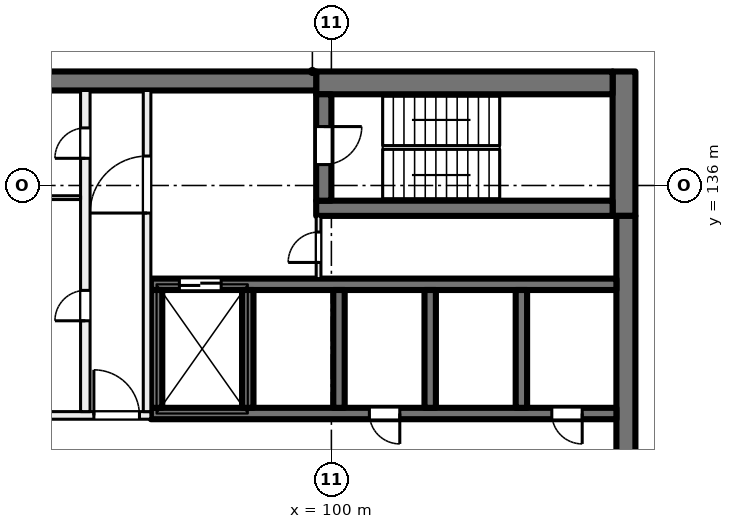
"""IFC4 building model, lengths in metres.
Left out: names, types, materials, properties, quantities, classifications, styles, units other than length and angle.
Written with IfcOpenShell. Run it as: python <this file> out.ifc"""

import sys

from ifc_helpers import new_model, si_unit, direction, frame, frame_2d, origin, place, context, subcontext, project, spatial, rectangle, extrude, element, fill, save


model = new_model("IFC4")
c1 = context("Model", 3, precision=1e-05, world=origin(), true_north=direction((0.0, 1.0)))
c2 = subcontext(c1, "Body", "Model", "MODEL_VIEW")
j1 = project(units=[si_unit("LENGTHUNIT", "METRE"), si_unit("PLANEANGLEUNIT", "RADIAN")], contexts=[c1])
p1 = place(None, origin())
s1 = spatial("IfcSite", under=j1, at=p1, CompositionType="ELEMENT")
p2 = place(p1, origin())
s2 = spatial("IfcBuilding", under=s1, at=p2, CompositionType="ELEMENT")
p3 = place(p2, frame((0.0, 0.0, 216.0)))
s3 = spatial("IfcBuildingStorey", under=s2, at=p3, CompositionType="ELEMENT", Elevation=216.0)
p4 = place(p3, frame((107.7, 139.0, 0.0), z_axis=(0.0, 0.0, 1.0), x_axis=(0.0, -1.0, 0.0)))
e1 = element("IfcWall", 1, at=p4, inside=s3, PredefinedType="SHEAR", context=c2, shape_type="SweptSolid", body=[
    extrude(rectangle(XDim=3.8, YDim=0.6, at=frame_2d((1.9, 0.0))), origin(), (0.0, 0.0, 1.0), 4.0),
])
p5 = place(p3, frame((107.75, 135.2, 0.0), z_axis=(0.0, 0.0, 1.0), x_axis=(0.0, -1.0, 0.0)))
e2 = element("IfcWall", 2, at=p5, inside=s3, PredefinedType="SHEAR", context=c2, shape_type="SweptSolid", body=[
    extrude(rectangle(XDim=14.4, YDim=0.5, at=frame_2d((7.2, 0.0))), origin(), (0.0, 0.0, 1.0), 4.0),
])
p6 = place(p3, frame((107.4, 138.7, 0.0), z_axis=(0.0, 0.0, 1.0), x_axis=(-1.0, 0.0, 0.0)))
e3 = element("IfcWall", 3, at=p6, inside=s3, PredefinedType="SHEAR", context=c2, shape_type="SweptSolid", body=[
    extrude(rectangle(XDim=7.8, YDim=0.6, at=frame_2d((3.9, 0.0))), origin(), (0.0, 0.0, 1.0), 4.0),
])
p7 = place(p3, frame((99.6, 138.75, 0.0), z_axis=(0.0, 0.0, 1.0), x_axis=(-1.0, 0.0, 0.0)))
e4 = element("IfcWall", 4, at=p7, inside=s3, PredefinedType="SHEAR", context=c2, shape_type="SweptSolid", body=[
    extrude(rectangle(XDim=8.975, YDim=0.5, at=frame_2d((4.488, 0.0))), origin(), (0.0, 0.0, 1.0), 4.0),
])
p8 = place(p3, frame((107.4, 135.4, 0.0), z_axis=(0.0, 0.0, 1.0), x_axis=(-1.0, 0.0, 0.0)))
e5 = element("IfcWall", 5, at=p8, inside=s3, PredefinedType="SHEAR", context=c2, shape_type="SweptSolid", body=[
    extrude(rectangle(XDim=7.8, YDim=0.4, at=frame_2d((3.9, 0.0))), origin(), (0.0, 0.0, 1.0), 4.0),
])
p9 = place(p3, frame((99.8, 138.4, 0.0), z_axis=(0.0, 0.0, 1.0), x_axis=(0.0, -1.0, 0.0)))
e6 = element("IfcWall", 6, at=p9, inside=s3, PredefinedType="SHEAR", context=c2, shape_type="SweptSolid", body=[
    extrude(rectangle(XDim=2.8, YDim=0.4, at=frame_2d((1.4, 0.0))), origin(), (0.0, 0.0, 1.0), 4.0),
])
p10 = place(p9, frame((0.85, 0.0, 0.0)))
e7 = element("IfcOpeningElement", 7, at=p10, cuts=e6, PredefinedType="OPENING", context=c2, shape_type="SweptSolid", body=[
    extrude(rectangle(XDim=1.0, YDim=2.1, at=frame_2d((0.5, 1.05))), frame((0.0, 0.21, 0.0), z_axis=(0.0, -1.0, 0.0), x_axis=(1.0, 0.0, 0.0)), (0.0, 0.0, 1.0), 0.42),
])
p11 = place(p3, frame((107.5, 130.0, 0.0), z_axis=(0.0, 0.0, 1.0), x_axis=(-1.0, 0.0, 0.0)))
e8 = element("IfcWall", 8, at=p11, inside=s3, PredefinedType="SHEAR", context=c2, shape_type="SweptSolid", body=[
    extrude(rectangle(XDim=12.25, YDim=0.3, at=frame_2d((6.125, 0.0))), origin(), (0.0, 0.0, 1.0), 4.0),
])
p12 = place(p11, frame((0.9, 0.0, 0.0)))
e9 = element("IfcOpeningElement", 9, at=p12, cuts=e8, PredefinedType="OPENING", context=c2, shape_type="SweptSolid", body=[
    extrude(rectangle(XDim=0.8, YDim=2.1, at=frame_2d((0.4, 1.05))), frame((0.0, 0.16, 0.0), z_axis=(0.0, -1.0, 0.0), x_axis=(1.0, 0.0, 0.0)), (0.0, 0.0, 1.0), 0.32),
])
p13 = place(p11, frame((5.7, 0.0, 0.0)))
e10 = element("IfcOpeningElement", 10, at=p13, cuts=e8, PredefinedType="OPENING", context=c2, shape_type="SweptSolid", body=[
    extrude(rectangle(XDim=0.8, YDim=2.1, at=frame_2d((0.4, 1.05))), frame((0.0, 0.16, 0.0), z_axis=(0.0, -1.0, 0.0), x_axis=(1.0, 0.0, 0.0)), (0.0, 0.0, 1.0), 0.32),
])
p14 = place(p3, frame((107.5, 133.4, 0.0), z_axis=(0.0, 0.0, 1.0), x_axis=(-1.0, 0.0, 0.0)))
e11 = element("IfcWall", 11, at=p14, inside=s3, PredefinedType="SHEAR", context=c2, shape_type="SweptSolid", body=[
    extrude(rectangle(XDim=12.25, YDim=0.3, at=frame_2d((6.125, 0.0))), origin(), (0.0, 0.0, 1.0), 4.0),
])
p15 = place(p14, frame((10.4, 0.0, 0.0)))
e12 = element("IfcOpeningElement", 12, at=p15, cuts=e11, PredefinedType="OPENING", context=c2, shape_type="SweptSolid", body=[
    extrude(rectangle(XDim=1.1, YDim=2.1, at=frame_2d((0.55, 1.05))), frame((0.0, 0.16, 0.0), z_axis=(0.0, -1.0, 0.0), x_axis=(1.0, 0.0, 0.0)), (0.0, 0.0, 1.0), 0.32),
])
for number, where, z_axis, x_axis in (
    (13, (105.0, 133.25, 0.0), (0.0, 0.0, 1.0), (0.0, -1.0, 0.0)),
    (14, (102.6, 133.25, 0.0), (0.0, 0.0, 1.0), (0.0, -1.0, 0.0)),
    (15, (100.2, 133.25, 0.0), (0.0, 0.0, 1.0), (0.0, -1.0, 0.0)),
    (16, (97.8, 133.25, 0.0), (0.0, 0.0, 1.0), (0.0, -1.0, 0.0)),
    (17, (95.4, 133.25, 0.0), (0.0, 0.0, 1.0), (0.0, -1.0, 0.0)),
):
    element("IfcWall", number, at=place(p3, frame(where, z_axis=z_axis, x_axis=x_axis)), inside=s3, PredefinedType="SHEAR", context=c2, shape_type="SweptSolid", body=[
        extrude(rectangle(XDim=3.1, YDim=0.3, at=frame_2d((1.55, 0.0))), origin(), (0.0, 0.0, 1.0), 4.0),
    ])
p16 = place(p3, frame((91.3, 129.95, 0.0), z_axis=(0.0, 0.0, 1.0), x_axis=(1.0, 0.0, 0.0)))
e18 = element("IfcWall", 18, at=p16, inside=s3, PredefinedType="PARTITIONING", context=c2, shape_type="SweptSolid", body=[
    extrude(rectangle(XDim=3.95, YDim=0.2, at=frame_2d((1.975, 0.0))), origin(), (0.0, 0.0, 1.0), 3.625),
])
p17 = place(p16, frame((2.45, 0.0, 0.0)))
e19 = element("IfcOpeningElement", 19, at=p17, cuts=e18, PredefinedType="OPENING", context=c2, shape_type="SweptSolid", body=[
    extrude(rectangle(XDim=1.2, YDim=2.1, at=frame_2d((0.6, 1.05))), frame((0.0, 0.11, 0.0), z_axis=(0.0, -1.0, 0.0), x_axis=(1.0, 0.0, 0.0)), (0.0, 0.0, 1.0), 0.22),
])
p18 = place(p3, frame((95.15, 130.05, 0.0), z_axis=(0.0, 0.0, 1.0), x_axis=(0.0, 1.0, 0.0)))
e20 = element("IfcWall", 20, at=p18, inside=s3, PredefinedType="PARTITIONING", context=c2, shape_type="SweptSolid", body=[
    extrude(rectangle(XDim=8.45, YDim=0.2, at=frame_2d((4.225, 0.0))), origin(), (0.0, 0.0, 1.0), 3.625),
])
p19 = place(p18, frame((5.225, 0.0, 0.0)))
e21 = element("IfcOpeningElement", 21, at=p19, cuts=e20, PredefinedType="OPENING", context=c2, shape_type="SweptSolid", body=[
    extrude(rectangle(XDim=1.5, YDim=2.1, at=frame_2d((0.75, 1.05))), frame((0.0, 0.11, 0.0), z_axis=(0.0, -1.0, 0.0), x_axis=(1.0, 0.0, 0.0)), (0.0, 0.0, 1.0), 0.22),
])
p20 = place(p3, frame((93.525, 130.05, 0.0), z_axis=(0.0, 0.0, 1.0), x_axis=(0.0, 1.0, 0.0)))
e22 = element("IfcWall", 22, at=p20, inside=s3, PredefinedType="PARTITIONING", context=c2, shape_type="SweptSolid", body=[
    extrude(rectangle(XDim=8.45, YDim=0.25, at=frame_2d((4.225, 0.0))), origin(), (0.0, 0.0, 1.0), 3.625),
])
p21 = place(p20, frame((2.39, 0.0, 0.0)))
e23 = element("IfcOpeningElement", 23, at=p21, cuts=e22, PredefinedType="OPENING", context=c2, shape_type="SweptSolid", body=[
    extrude(rectangle(XDim=0.8, YDim=2.1, at=frame_2d((0.4, 1.05))), frame((0.0, 0.135, 0.0), z_axis=(0.0, -1.0, 0.0), x_axis=(1.0, 0.0, 0.0)), (0.0, 0.0, 1.0), 0.27),
])
p22 = place(p20, frame((6.665, 0.0, 0.0)))
e24 = element("IfcOpeningElement", 24, at=p22, cuts=e22, PredefinedType="OPENING", context=c2, shape_type="SweptSolid", body=[
    extrude(rectangle(XDim=0.8, YDim=2.1, at=frame_2d((0.4, 1.05))), frame((0.0, 0.135, 0.0), z_axis=(0.0, -1.0, 0.0), x_axis=(1.0, 0.0, 0.0)), (0.0, 0.0, 1.0), 0.27),
])
p23 = place(p3, frame((99.663, 133.55, 0.0), z_axis=(0.0, 0.0, 1.0), x_axis=(0.0, 1.0, 0.0)))
e25 = element("IfcWall", 25, at=p23, inside=s3, PredefinedType="PARTITIONING", context=c2, shape_type="SweptSolid", body=[
    extrude(rectangle(XDim=1.65, YDim=0.125, at=frame_2d((0.825, 0.0))), origin(), (0.0, 0.0, 1.0), 3.625),
])
p24 = place(p23, frame((0.425, 0.0, 0.0)))
e26 = element("IfcOpeningElement", 26, at=p24, cuts=e25, PredefinedType="OPENING", context=c2, shape_type="SweptSolid", body=[
    extrude(rectangle(XDim=0.8, YDim=2.1, at=frame_2d((0.4, 1.05))), frame((0.0, 0.073, 0.0), z_axis=(0.0, -1.0, 0.0), x_axis=(1.0, 0.0, 0.0)), (0.0, 0.0, 1.0), 0.145),
])
p25 = place(p3, frame((91.3, 135.68, 0.0), z_axis=(0.0, 0.0, 1.0), x_axis=(1.0, 0.0, 0.0)))
e27 = element("IfcWall", 27, at=p25, inside=s3, PredefinedType="PARTITIONING", context=c2, shape_type="SweptSolid", body=[
    extrude(rectangle(XDim=2.1, YDim=0.1, at=frame_2d((1.05, 0.0))), origin(), (0.0, 0.0, 1.0), 3.625),
])
p26 = place(p12, origin())
e28 = element("IfcDoor", 28, at=p26, inside=s3, OperationType="SINGLE_SWING_LEFT", PredefinedType="DOOR", context=c2, shape_type="SweptSolid", body=[
    extrude(rectangle(XDim=0.8, YDim=2.1, at=frame_2d((0.4, 1.05))), frame((0.0, 0.025, 0.0), z_axis=(0.0, -1.0, 0.0), x_axis=(1.0, 0.0, 0.0)), (0.0, 0.0, 1.0), 0.05),
])
fill(e9, e28)
p27 = place(p13, origin())
e29 = element("IfcDoor", 29, at=p27, inside=s3, OperationType="SINGLE_SWING_RIGHT", PredefinedType="DOOR", context=c2, shape_type="SweptSolid", body=[
    extrude(rectangle(XDim=0.8, YDim=2.1, at=frame_2d((0.4, 1.05))), frame((0.0, 0.025, 0.0), z_axis=(0.0, -1.0, 0.0), x_axis=(1.0, 0.0, 0.0)), (0.0, 0.0, 1.0), 0.05),
])
fill(e10, e29)
p28 = place(p17, origin())
e30 = element("IfcDoor", 30, at=p28, inside=s3, OperationType="DOUBLE_DOOR_SINGLE_SWING", PredefinedType="DOOR", context=c2, shape_type="SweptSolid", body=[
    extrude(rectangle(XDim=1.2, YDim=2.1, at=frame_2d((0.6, 1.05))), frame((0.0, 0.025, 0.0), z_axis=(0.0, -1.0, 0.0), x_axis=(1.0, 0.0, 0.0)), (0.0, 0.0, 1.0), 0.05),
])
fill(e19, e30)
p29 = place(p19, origin())
e31 = element("IfcDoor", 31, at=p29, inside=s3, OperationType="DOUBLE_DOOR_SINGLE_SWING", PredefinedType="DOOR", context=c2, shape_type="SweptSolid", body=[
    extrude(rectangle(XDim=1.5, YDim=2.1, at=frame_2d((0.75, 1.05))), frame((0.0, 0.025, 0.0), z_axis=(0.0, -1.0, 0.0), x_axis=(1.0, 0.0, 0.0)), (0.0, 0.0, 1.0), 0.05),
])
fill(e21, e31)
p30 = place(p10, origin())
e32 = element("IfcDoor", 32, at=p30, inside=s3, OperationType="SINGLE_SWING_RIGHT", PredefinedType="DOOR", context=c2, shape_type="SweptSolid", body=[
    extrude(rectangle(XDim=1.0, YDim=2.1, at=frame_2d((0.5, 1.05))), frame((0.0, 0.025, 0.0), z_axis=(0.0, -1.0, 0.0), x_axis=(1.0, 0.0, 0.0)), (0.0, 0.0, 1.0), 0.05),
])
fill(e7, e32)
p31 = place(p24, origin())
e33 = element("IfcDoor", 33, at=p31, inside=s3, OperationType="SINGLE_SWING_LEFT", PredefinedType="DOOR", context=c2, shape_type="SweptSolid", body=[
    extrude(rectangle(XDim=0.8, YDim=2.1, at=frame_2d((0.4, 1.05))), frame((0.0, 0.025, 0.0), z_axis=(0.0, -1.0, 0.0), x_axis=(1.0, 0.0, 0.0)), (0.0, 0.0, 1.0), 0.05),
])
fill(e26, e33)
p32 = place(p21, origin())
e34 = element("IfcDoor", 34, at=p32, inside=s3, OperationType="SINGLE_SWING_RIGHT", PredefinedType="DOOR", context=c2, shape_type="SweptSolid", body=[
    extrude(rectangle(XDim=0.8, YDim=2.1, at=frame_2d((0.4, 1.05))), frame((0.0, 0.025, 0.0), z_axis=(0.0, -1.0, 0.0), x_axis=(1.0, 0.0, 0.0)), (0.0, 0.0, 1.0), 0.05),
])
fill(e23, e34)
p33 = place(p22, origin())
e35 = element("IfcDoor", 35, at=p33, inside=s3, OperationType="SINGLE_SWING_LEFT", PredefinedType="DOOR", context=c2, shape_type="SweptSolid", body=[
    extrude(rectangle(XDim=0.8, YDim=2.1, at=frame_2d((0.4, 1.05))), frame((0.0, 0.025, 0.0), z_axis=(0.0, -1.0, 0.0), x_axis=(1.0, 0.0, 0.0)), (0.0, 0.0, 1.0), 0.05),
])
fill(e24, e35)
p34 = place(p15, origin())
e36 = element("IfcDoor", 36, at=p34, inside=s3, OperationType="DOUBLE_DOOR_SLIDING", PredefinedType="DOOR", context=c2, shape_type="SweptSolid", body=[
    extrude(rectangle(XDim=1.1, YDim=2.1, at=frame_2d((0.55, 1.05))), frame((0.0, 0.025, 0.0), z_axis=(0.0, -1.0, 0.0), x_axis=(1.0, 0.0, 0.0)), (0.0, 0.0, 1.0), 0.05),
])
fill(e12, e36)
save(model, sys.argv[1])
